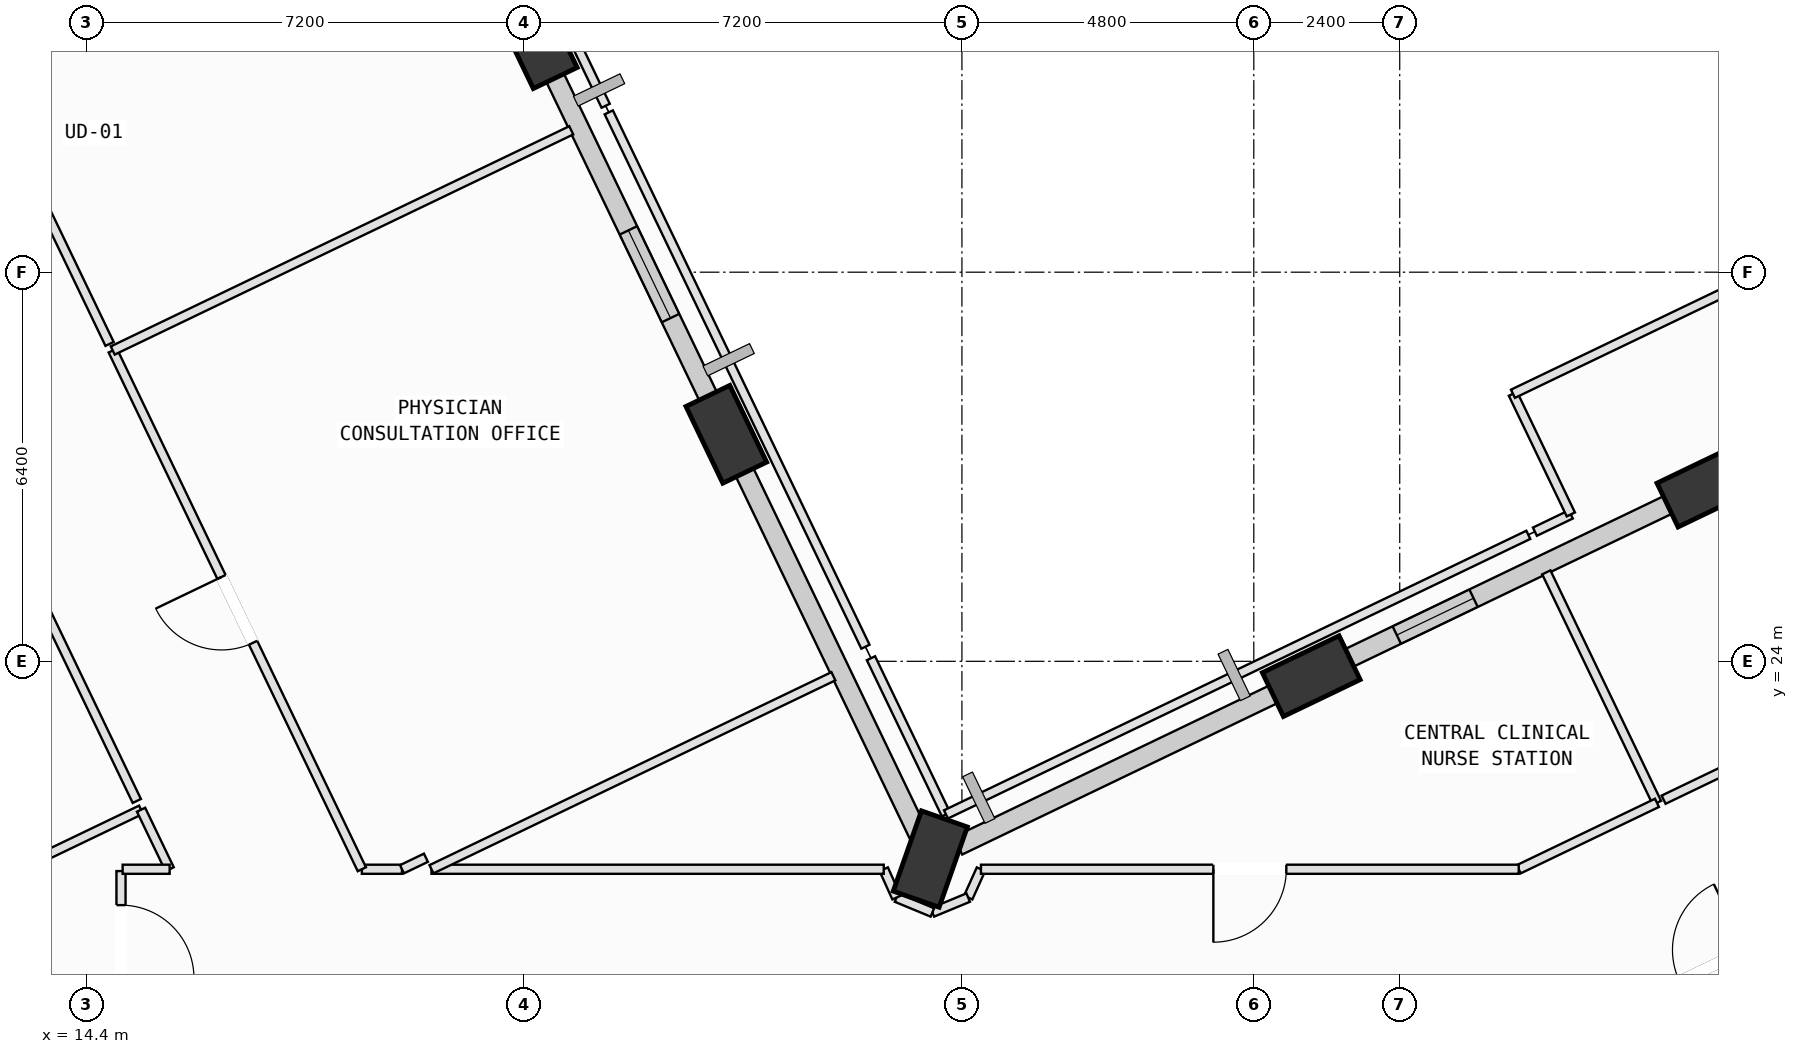
"""IFC4 building model, lengths in metres.
Left out: names, types, materials, properties, quantities, classifications, styles, units other than length and angle.
Written with IfcOpenShell. Run it as: python <this file> out.ifc"""

import sys

from ifc_helpers import new_model, si_unit, direction, frame, frame_2d, origin, origin_2d, place, context, subcontext, project, spatial, rectangle, extrude, element, fill, save


model = new_model("IFC4")
c1 = context("Model", 3, precision=1e-05, world=origin(), true_north=direction((0.0, 1.0)))
c2 = subcontext(c1, "Body", "Model", "MODEL_VIEW")
j1 = project(units=[si_unit("LENGTHUNIT", "METRE"), si_unit("PLANEANGLEUNIT", "RADIAN")], contexts=[c1])
p1 = place(None, origin())
s1 = spatial("IfcSite", under=j1, at=p1, CompositionType="ELEMENT")
p2 = place(p1, origin())
s2 = spatial("IfcBuilding", under=s1, at=p2, CompositionType="ELEMENT")
p3 = place(p2, frame((0.0, 0.0, 132.4)))
s3 = spatial("IfcBuildingStorey", under=s2, at=p3, CompositionType="ELEMENT", Elevation=132.4)
p4 = place(p3, frame((41.035, 26.873, 0.002), z_axis=(-0.00885366467, 0.030774117199, 0.99948715166), x_axis=(-0.746694417062, -0.665022783918, 0.013861616019)))
e1 = element("IfcColumn", 1, at=p4, inside=s3, PredefinedType="COLUMN", context=c2, shape_type="SweptSolid", body=[
    extrude(rectangle(XDim=1.4, YDim=0.8, at=origin_2d()), origin(), (0.0, 0.0, 1.0), 3.998),
])
p5 = place(p3, frame((34.545, 23.756, 0.002), z_axis=(0.004276303261, 0.003970853028, 0.999982972633), x_axis=(-0.930596934724, 0.366036834219, 0.002526079248)))
e2 = element("IfcColumn", 2, at=p5, inside=s3, PredefinedType="COLUMN", context=c2, shape_type="SweptSolid", body=[
    extrude(rectangle(XDim=1.4, YDim=0.8, at=origin_2d()), origin(), (0.0, 0.0, 1.0), 3.996),
])
p6 = place(p3, frame((28.28, 20.748, 0.002), z_axis=(0.01697679214, -0.021923267547, 0.999615505516), x_axis=(-0.315480626225, 0.948571315407, 0.026161690777)))
e3 = element("IfcColumn", 3, at=p6, inside=s3, PredefinedType="COLUMN", context=c2, shape_type="SweptSolid", body=[
    extrude(rectangle(XDim=1.4, YDim=0.8, at=origin_2d()), origin(), (0.0, 0.0, 1.0), 3.998),
])
p7 = place(p3, frame((24.925, 27.734, 0.002), z_axis=(-0.011843149129, -0.036017824671, 0.99928096956), x_axis=(-0.129836305253, 0.990946191791, 0.034178630945)))
e4 = element("IfcColumn", 4, at=p7, inside=s3, PredefinedType="COLUMN", context=c2, shape_type="SweptSolid", body=[
    extrude(rectangle(XDim=1.4, YDim=0.8, at=origin_2d()), origin(), (0.0, 0.0, 1.0), 3.999),
])
p8 = place(p3, frame((21.808, 34.224, 0.002), z_axis=(-0.038595202301, -0.049082366275, 0.998048762176), x_axis=(0.215850292416, 0.974802805821, 0.056286241908)))
e5 = element("IfcColumn", 5, at=p8, inside=s3, PredefinedType="COLUMN", context=c2, shape_type="SweptSolid", body=[
    extrude(rectangle(XDim=1.4, YDim=0.8, at=origin_2d()), origin(), (0.0, 0.0, 1.0), 4.004),
])
p9 = place(p3, frame((35.002, 23.976, 0.0), z_axis=(0.0, 0.0, 1.0), x_axis=(0.901466619475, 0.432848627089, 0.0)))
e6 = element("IfcWall", 6, at=p9, inside=s3, PredefinedType="SOLIDWALL", context=c2, shape_type="SweptSolid", body=[
    extrude(rectangle(XDim=6.211, YDim=0.32, at=frame_2d((3.105, 0.0))), origin(), (0.0, 0.0, 1.0), 3.165),
])
p10 = place(p9, frame((1.053, 0.0, 0.75)))
e7 = element("IfcOpeningElement", 7, at=p10, cuts=e6, PredefinedType="OPENING", context=c2, shape_type="SweptSolid", body=[
    extrude(rectangle(XDim=1.4, YDim=1.85, at=frame_2d((0.7, 0.925))), frame((0.0, 0.17, 0.0), z_axis=(0.0, -1.0, 0.0), x_axis=(1.0, 0.0, 0.0)), (0.0, 0.0, 1.0), 0.34),
])
p11 = place(p3, frame((28.735, 20.966, 0.0), z_axis=(0.0, 0.0, 1.0), x_axis=(0.901457206076, 0.432868231237, 0.0)))
e8 = element("IfcWall", 8, at=p11, inside=s3, PredefinedType="SOLIDWALL", context=c2, shape_type="SweptSolid", body=[
    extrude(rectangle(XDim=5.96, YDim=0.32, at=frame_2d((2.98, 0.0))), origin(), (0.0, 0.0, 1.0), 2.965),
])
p12 = place(p3, frame((25.162, 27.24, 0.0), z_axis=(0.0, 0.0, 1.0), x_axis=(0.432883696329, -0.901449779773, 0.0)))
e9 = element("IfcWall", 9, at=p12, inside=s3, PredefinedType="SOLIDWALL", context=c2, shape_type="SweptSolid", body=[
    extrude(rectangle(XDim=6.76, YDim=0.32, at=frame_2d((3.38, 0.0))), origin(), (0.0, 0.0, 1.0), 3.165),
])
p13 = place(p3, frame((22.042, 33.739, 0.0), z_axis=(0.0, 0.0, 1.0), x_axis=(0.432859884789, -0.901461213886, 0.0)))
e10 = element("IfcWall", 10, at=p13, inside=s3, PredefinedType="SOLIDWALL", context=c2, shape_type="SweptSolid", body=[
    extrude(rectangle(XDim=6.223, YDim=0.32, at=frame_2d((3.111, 0.0))), origin(), (0.0, 0.0, 1.0), 3.165),
])
p14 = place(p13, frame((2.941, 0.0, 0.75)))
e11 = element("IfcOpeningElement", 11, at=p14, cuts=e10, PredefinedType="OPENING", context=c2, shape_type="SweptSolid", body=[
    extrude(rectangle(XDim=1.6, YDim=1.95, at=frame_2d((0.8, 0.975))), frame((0.0, 0.17, 0.0), z_axis=(0.0, -1.0, 0.0), x_axis=(1.0, 0.0, 0.0)), (0.0, 0.0, 1.0), 0.34),
])
p15 = place(p3, frame((36.5, 16.763, 0.0), z_axis=(0.0, 0.0, 1.0), x_axis=(0.901430980475, 0.432922842363, 0.0)))
e12 = element("IfcWall", 12, at=p15, inside=s3, PredefinedType="PARTITIONING", context=c2, shape_type="SweptSolid", body=[
    extrude(rectangle(XDim=10.305, YDim=0.15, at=frame_2d((5.152, 0.0))), origin(), (0.0, 0.0, 1.0), 2.965),
])
p16 = place(p15, frame((4.552, 0.0, 0.0)))
e13 = element("IfcOpeningElement", 13, at=p16, cuts=e12, PredefinedType="OPENING", context=c2, shape_type="SweptSolid", body=[
    extrude(rectangle(XDim=1.2, YDim=2.15, at=frame_2d((0.6, 1.075))), frame((0.0, 0.085, 0.0), z_axis=(0.0, -1.0, 0.0), x_axis=(1.0, 0.0, 0.0)), (0.0, 0.0, 1.0), 0.17),
])
p17 = place(p3, frame((14.97, 20.55, 0.0), z_axis=(0.0, 0.0, 1.0), x_axis=(0.0, -1.0, 0.0)))
e14 = element("IfcWall", 14, at=p17, inside=s3, PredefinedType="PARTITIONING", context=c2, shape_type="SweptSolid", body=[
    extrude(rectangle(XDim=2.32, YDim=0.15, at=frame_2d((1.16, 0.0))), origin(), (0.0, 0.0, 1.0), 2.965),
])
p18 = place(p17, frame((0.56, 0.0, 0.0)))
e15 = element("IfcOpeningElement", 15, at=p18, cuts=e14, PredefinedType="OPENING", context=c2, shape_type="SweptSolid", body=[
    extrude(rectangle(XDim=1.2, YDim=2.15, at=frame_2d((0.6, 1.075))), frame((0.0, 0.085, 0.0), z_axis=(0.0, -1.0, 0.0), x_axis=(1.0, 0.0, 0.0)), (0.0, 0.0, 1.0), 0.17),
])
p19 = place(p3, frame((6.812, 17.483, 0.0), z_axis=(0.0, 0.0, 1.0), x_axis=(0.90144374065, 0.432896272152, 0.0)))
e16 = element("IfcWall", 16, at=p19, inside=s3, PredefinedType="PARTITIONING", context=c2, shape_type="SweptSolid", body=[
    extrude(rectangle(XDim=9.416, YDim=0.15, at=frame_2d((4.708, 0.0))), origin(), (0.0, 0.0, 1.0), 3.78),
])
p20 = place(p3, frame((15.3, 21.559, 0.0), z_axis=(0.0, 0.0, 1.0), x_axis=(0.432767610523, -0.901505515947, 0.0)))
e17 = element("IfcWall", 17, at=p20, inside=s3, PredefinedType="PARTITIONING", context=c2, shape_type="SweptSolid", body=[
    extrude(rectangle(XDim=1.086, YDim=0.15, at=frame_2d((0.543, 0.0))), origin(), (0.0, 0.0, 1.0), 3.78),
])
p21 = place(p3, frame((15.77, 20.58, 0.0), z_axis=(0.0, 0.0, 1.0), x_axis=(-1.0, 0.0, 0.0)))
e18 = element("IfcWall", 18, at=p21, inside=s3, PredefinedType="PARTITIONING", context=c2, shape_type="SweptSolid", body=[
    extrude(rectangle(XDim=0.773, YDim=0.15, at=frame_2d((0.386, 0.0))), origin(), (0.0, 0.0, 1.0), 3.78),
])
p22 = place(p3, frame((9.499, 33.638, 0.0), z_axis=(0.0, 0.0, 1.0), x_axis=(0.432861750003, -0.901460318253, 0.0)))
e19 = element("IfcWall", 19, at=p22, inside=s3, PredefinedType="PARTITIONING", context=c2, shape_type="SweptSolid", body=[
    extrude(rectangle(XDim=13.24, YDim=0.15, at=frame_2d((6.62, 0.0))), origin(), (0.0, 0.0, 1.0), 2.965),
])
p23 = place(p22, frame((6.02, 0.0, 0.0)))
e20 = element("IfcOpeningElement", 20, at=p23, cuts=e19, PredefinedType="OPENING", context=c2, shape_type="SweptSolid", body=[
    extrude(rectangle(XDim=1.2, YDim=2.15, at=frame_2d((0.6, 1.075))), frame((0.0, 0.085, 0.0), z_axis=(0.0, -1.0, 0.0), x_axis=(1.0, 0.0, 0.0)), (0.0, 0.0, 1.0), 0.17),
])
p24 = place(p3, frame((29.113, 20.58, 0.0), z_axis=(0.0, 0.0, 1.0), x_axis=(-0.410741961607, -0.911751633382, 0.0)))
e21 = element("IfcWall", 21, at=p24, inside=s3, PredefinedType="PARTITIONING", context=c2, shape_type="SweptSolid", body=[
    extrude(rectangle(XDim=0.511, YDim=0.15, at=frame_2d((0.256, 0.0))), origin(), (0.0, 0.0, 1.0), 3.78),
])
p25 = place(p3, frame((28.903, 20.114, 0.0), z_axis=(0.0, 0.0, 1.0), x_axis=(-0.923946844683, -0.382520885967, 0.0)))
e22 = element("IfcWall", 22, at=p25, inside=s3, PredefinedType="PARTITIONING", context=c2, shape_type="SweptSolid", body=[
    extrude(rectangle(XDim=0.638, YDim=0.15, at=frame_2d((0.319, 0.0))), origin(), (0.0, 0.0, 1.0), 3.78),
])
p26 = place(p3, frame((28.314, 19.87, 0.0), z_axis=(0.0, 0.0, 1.0), x_axis=(-0.924114659462, 0.382115291723, 0.0)))
e23 = element("IfcWall", 23, at=p26, inside=s3, PredefinedType="PARTITIONING", context=c2, shape_type="SweptSolid", body=[
    extrude(rectangle(XDim=0.638, YDim=0.15, at=frame_2d((0.319, 0.0))), origin(), (0.0, 0.0, 1.0), 3.78),
])
p27 = place(p3, frame((27.724, 20.114, 0.0), z_axis=(0.0, 0.0, 1.0), x_axis=(-0.411138875134, 0.911572720826, 0.0)))
e24 = element("IfcWall", 24, at=p27, inside=s3, PredefinedType="PARTITIONING", context=c2, shape_type="SweptSolid", body=[
    extrude(rectangle(XDim=0.511, YDim=0.15, at=frame_2d((0.256, 0.0))), origin(), (0.0, 0.0, 1.0), 3.78),
])
p28 = place(p3, frame((27.514, 20.58, 0.0), z_axis=(0.0, 0.0, 1.0), x_axis=(-1.0, 0.0, 0.0)))
e25 = element("IfcWall", 25, at=p28, inside=s3, PredefinedType="PARTITIONING", context=c2, shape_type="SweptSolid", body=[
    extrude(rectangle(XDim=7.438, YDim=0.15, at=frame_2d((3.719, 0.0))), origin(), (0.0, 0.0, 1.0), 3.78),
])
p29 = place(p3, frame((20.076, 20.58, 0.0), z_axis=(0.0, 0.0, 1.0), x_axis=(0.901471094666, 0.432839306765, 0.0)))
e26 = element("IfcWall", 26, at=p29, inside=s3, PredefinedType="PARTITIONING", context=c2, shape_type="SweptSolid", body=[
    extrude(rectangle(XDim=7.333, YDim=0.15, at=frame_2d((3.666, 0.0))), origin(), (0.0, 0.0, 1.0), 3.78),
])
p30 = place(p3, frame((27.304, 24.051, 0.0), z_axis=(0.0, 0.0, 1.0), x_axis=(0.433006738205, -0.901390683705, 0.0)))
e27 = element("IfcWall", 27, at=p30, inside=s3, PredefinedType="PARTITIONING", context=c2, shape_type="SweptSolid", body=[
    extrude(rectangle(XDim=2.85, YDim=0.15, at=frame_2d((1.425, 0.0))), origin(), (0.0, 0.0, 1.0), 3.78),
])
p31 = place(p3, frame((28.538, 21.482, 0.0), z_axis=(0.0, 0.0, 1.0), x_axis=(0.901477867435, 0.432825200889, 0.0)))
e28 = element("IfcWall", 28, at=p31, inside=s3, PredefinedType="PARTITIONING", context=c2, shape_type="SweptSolid", body=[
    extrude(rectangle(XDim=10.624, YDim=0.15, at=frame_2d((5.312, 0.0))), origin(), (0.0, 0.0, 1.0), 3.78),
])
p32 = place(p3, frame((38.411, 25.463, 0.0), z_axis=(0.0, 0.0, 1.0), x_axis=(0.432827326229, -0.901476846996, 0.0)))
e29 = element("IfcWall", 29, at=p32, inside=s3, PredefinedType="PARTITIONING", context=c2, shape_type="SweptSolid", body=[
    extrude(rectangle(XDim=4.205, YDim=0.15, at=frame_2d((2.103, 0.0))), origin(), (0.0, 0.0, 1.0), 3.78),
])
p33 = place(p3, frame((40.231, 21.672, 0.0), z_axis=(0.0, 0.0, 1.0), x_axis=(-0.901436954351, -0.432910403351, 0.0)))
e30 = element("IfcWall", 30, at=p33, inside=s3, PredefinedType="PARTITIONING", context=c2, shape_type="SweptSolid", body=[
    extrude(rectangle(XDim=2.522, YDim=0.15, at=frame_2d((1.261, 0.0))), origin(), (0.0, 0.0, 1.0), 2.945),
])
p34 = place(p3, frame((37.957, 20.58, 0.0), z_axis=(0.0, 0.0, 1.0), x_axis=(-1.0, 0.0, 0.0)))
e31 = element("IfcWall", 31, at=p34, inside=s3, PredefinedType="PARTITIONING", context=c2, shape_type="SweptSolid", body=[
    extrude(rectangle(XDim=8.844, YDim=0.15, at=frame_2d((4.422, 0.0))), origin(), (0.0, 0.0, 1.0), 3.365),
])
p35 = place(p34, frame((3.822, 0.0, 0.0)))
e32 = element("IfcOpeningElement", 32, at=p35, cuts=e31, PredefinedType="OPENING", context=c2, shape_type="SweptSolid", body=[
    extrude(rectangle(XDim=1.2, YDim=2.15, at=frame_2d((0.6, 1.075))), frame((0.0, 0.085, 0.0), z_axis=(0.0, -1.0, 0.0), x_axis=(1.0, 0.0, 0.0)), (0.0, 0.0, 1.0), 0.17),
])
p36 = place(p3, frame((55.61, 29.058, 0.0), z_axis=(0.0, 0.0, 1.0), x_axis=(-0.901422279178, -0.432940959718, 0.0)))
e33 = element("IfcWall", 33, at=p36, inside=s3, PredefinedType="PARTITIONING", context=c2, shape_type="SweptSolid", body=[
    extrude(rectangle(XDim=16.94, YDim=0.15, at=frame_2d((8.47, 0.0))), origin(), (0.0, 0.0, 1.0), 2.945),
])
p37 = place(p36, frame((7.87, 0.0, 0.0)))
e34 = element("IfcOpeningElement", 34, at=p37, cuts=e33, PredefinedType="OPENING", context=c2, shape_type="SweptSolid", body=[
    extrude(rectangle(XDim=1.2, YDim=2.15, at=frame_2d((0.6, 1.075))), frame((0.0, 0.085, 0.0), z_axis=(0.0, -1.0, 0.0), x_axis=(1.0, 0.0, 0.0)), (0.0, 0.0, 1.0), 0.17),
])
p38 = place(p3, frame((38.223, 26.132, 0.0), z_axis=(0.0, 0.0, 1.0), x_axis=(0.901389385584, 0.433009440493, 0.0)))
e35 = element("IfcWall", 35, at=p38, inside=s3, PredefinedType="PARTITIONING", context=c2, shape_type="SweptSolid", body=[
    extrude(rectangle(XDim=0.656, YDim=0.15, at=frame_2d((0.328, 0.0))), origin(), (0.0, 0.0, 1.0), 3.78),
])
p39 = place(p3, frame((38.814, 26.416, 0.0), z_axis=(0.0, 0.0, 1.0), x_axis=(-0.432597604334, 0.901587107674, 0.0)))
e36 = element("IfcWall", 36, at=p39, inside=s3, PredefinedType="PARTITIONING", context=c2, shape_type="SweptSolid", body=[
    extrude(rectangle(XDim=2.2, YDim=0.15, at=frame_2d((1.1, 0.0))), origin(), (0.0, 0.0, 1.0), 3.78),
])
p40 = place(p3, frame((37.862, 28.4, 0.0), z_axis=(0.0, 0.0, 1.0), x_axis=(0.901468015734, 0.432845719175, 0.0)))
e37 = element("IfcWall", 37, at=p40, inside=s3, PredefinedType="PARTITIONING", context=c2, shape_type="SweptSolid", body=[
    extrude(rectangle(XDim=7.199, YDim=0.15, at=frame_2d((3.6, 0.0))), origin(), (0.0, 0.0, 1.0), 3.78),
])
p41 = place(p3, frame((19.591, 20.58, 0.0), z_axis=(0.0, 0.0, 1.0), x_axis=(-1.0, 0.0, 0.0)))
e38 = element("IfcWall", 38, at=p41, inside=s3, PredefinedType="PARTITIONING", context=c2, shape_type="SweptSolid", body=[
    extrude(rectangle(XDim=0.66, YDim=0.15, at=frame_2d((0.33, 0.0))), origin(), (0.0, 0.0, 1.0), 3.78),
])
p42 = place(p3, frame((18.931, 20.58, 0.0), z_axis=(0.0, 0.0, 1.0), x_axis=(-0.43286607563, 0.901458241168, 0.0)))
e39 = element("IfcWall", 39, at=p42, inside=s3, PredefinedType="PARTITIONING", context=c2, shape_type="SweptSolid", body=[
    extrude(rectangle(XDim=9.465, YDim=0.15, at=frame_2d((4.732, 0.0))), origin(), (0.0, 0.0, 1.0), 3.78),
])
p43 = place(p42, frame((4.132, 0.0, 0.0)))
e40 = element("IfcOpeningElement", 40, at=p43, cuts=e39, PredefinedType="OPENING", context=c2, shape_type="SweptSolid", body=[
    extrude(rectangle(XDim=1.2, YDim=2.15, at=frame_2d((0.6, 1.075))), frame((0.0, 0.085, 0.0), z_axis=(0.0, -1.0, 0.0), x_axis=(1.0, 0.0, 0.0)), (0.0, 0.0, 1.0), 0.17),
])
p44 = place(p3, frame((14.834, 29.112, 0.0), z_axis=(0.0, 0.0, 1.0), x_axis=(0.901468854951, 0.432843971373, 0.0)))
e41 = element("IfcWall", 41, at=p44, inside=s3, PredefinedType="PARTITIONING", context=c2, shape_type="SweptSolid", body=[
    extrude(rectangle(XDim=8.365, YDim=0.15, at=frame_2d((4.183, 0.0))), origin(), (0.0, 0.0, 1.0), 3.78),
])
p45 = place(p3, frame((22.992, 33.029, 0.0), z_axis=(0.0, 0.0, 1.0), x_axis=(0.432914217611, -0.901435122563, 0.0)))
e42 = element("IfcWall", 42, at=p45, inside=s3, PredefinedType="PARTITIONING", context=c2, shape_type="SweptSolid", body=[
    extrude(rectangle(XDim=9.75, YDim=0.15, at=frame_2d((4.875, 0.0))), origin(), (0.0, 0.0, 1.0), 3.78),
])
p46 = place(p3, frame((19.985, 20.769, 0.0), z_axis=(0.0, 0.0, 1.0), x_axis=(-0.901679917464, -0.432404123988, 0.0)))
e43 = element("IfcWall", 43, at=p46, inside=s3, PredefinedType="PARTITIONING", context=c2, shape_type="SweptSolid", body=[
    extrude(rectangle(XDim=0.437, YDim=0.15, at=frame_2d((0.219, 0.0))), origin(), (0.0, 0.0, 1.0), 3.78),
])
p47 = place(p3, frame((14.782, 29.22, 0.0), z_axis=(0.0, 0.0, 1.0), x_axis=(-0.432781462807, 0.901498866029, 0.0)))
e44 = element("IfcWall", 44, at=p47, inside=s3, PredefinedType="PARTITIONING", context=c2, shape_type="SweptSolid", body=[
    extrude(rectangle(XDim=6.93, YDim=0.15, at=frame_2d((3.465, 0.0))), origin(), (0.0, 0.0, 1.0), 3.78),
])
p48 = place(p47, frame((3.005, 0.0, 0.0)))
e45 = element("IfcOpeningElement", 45, at=p48, cuts=e44, PredefinedType="OPENING", context=c2, shape_type="SweptSolid", body=[
    extrude(rectangle(XDim=0.92, YDim=2.1, at=frame_2d((0.46, 1.05))), frame((0.0, 0.085, 0.0), z_axis=(0.0, -1.0, 0.0), x_axis=(1.0, 0.0, 0.0)), (0.0, 0.0, 1.0), 0.17),
])
p49 = place(p3, frame((19.941, 39.384, 0.0), z_axis=(0.0, 0.0, 1.0), x_axis=(0.432895982314, -0.901443879838, 0.0)))
e46 = element("IfcWall", 46, at=p49, inside=s3, PredefinedType="PARTITIONING", context=c2, shape_type="SweptSolid", body=[
    extrude(rectangle(XDim=6.93, YDim=0.15, at=frame_2d((3.465, 0.0))), origin(), (0.0, 0.0, 1.0), 3.78),
])
p50 = place(p10, origin())
e47 = element("IfcWindow", 47, at=p50, inside=s3, PartitioningType="SINGLE_PANEL", PredefinedType="WINDOW", context=c2, shape_type="SweptSolid", body=[
    extrude(rectangle(XDim=1.4, YDim=1.85, at=frame_2d((0.7, 0.925))), frame((0.0, 0.03, 0.0), z_axis=(0.0, -1.0, 0.0), x_axis=(1.0, 0.0, 0.0)), (0.0, 0.0, 1.0), 0.06),
])
fill(e7, e47)
p51 = place(p14, origin())
e48 = element("IfcWindow", 48, at=p51, inside=s3, PartitioningType="SINGLE_PANEL", PredefinedType="WINDOW", context=c2, shape_type="SweptSolid", body=[
    extrude(rectangle(XDim=1.6, YDim=1.95, at=frame_2d((0.8, 0.975))), frame((0.0, 0.03, 0.0), z_axis=(0.0, -1.0, 0.0), x_axis=(1.0, 0.0, 0.0)), (0.0, 0.0, 1.0), 0.06),
])
fill(e11, e48)
p52 = place(p16, origin())
e49 = element("IfcDoor", 49, at=p52, inside=s3, OperationType="SINGLE_SWING_RIGHT", PredefinedType="DOOR", context=c2, shape_type="SweptSolid", body=[
    extrude(rectangle(XDim=1.2, YDim=2.15, at=frame_2d((0.6, 1.075))), frame((0.0, 0.025, 0.0), z_axis=(0.0, -1.0, 0.0), x_axis=(1.0, 0.0, 0.0)), (0.0, 0.0, 1.0), 0.05),
])
fill(e13, e49)
p53 = place(p18, origin())
e50 = element("IfcDoor", 50, at=p53, inside=s3, OperationType="SINGLE_SWING_RIGHT", PredefinedType="DOOR", context=c2, shape_type="SweptSolid", body=[
    extrude(rectangle(XDim=1.2, YDim=2.15, at=frame_2d((0.6, 1.075))), frame((0.0, 0.025, 0.0), z_axis=(0.0, -1.0, 0.0), x_axis=(1.0, 0.0, 0.0)), (0.0, 0.0, 1.0), 0.05),
])
fill(e15, e50)
p54 = place(p35, origin())
e51 = element("IfcDoor", 51, at=p54, inside=s3, OperationType="SINGLE_SWING_RIGHT", PredefinedType="DOOR", context=c2, shape_type="SweptSolid", body=[
    extrude(rectangle(XDim=1.2, YDim=2.15, at=frame_2d((0.6, 1.075))), frame((0.0, 0.025, 0.0), z_axis=(0.0, -1.0, 0.0), x_axis=(1.0, 0.0, 0.0)), (0.0, 0.0, 1.0), 0.05),
])
fill(e32, e51)
p55 = place(p43, origin())
e52 = element("IfcDoor", 52, at=p55, inside=s3, OperationType="SINGLE_SWING_RIGHT", PredefinedType="DOOR", context=c2, shape_type="SweptSolid", body=[
    extrude(rectangle(XDim=1.2, YDim=2.15, at=frame_2d((0.6, 1.075))), frame((0.0, 0.025, 0.0), z_axis=(0.0, -1.0, 0.0), x_axis=(1.0, 0.0, 0.0)), (0.0, 0.0, 1.0), 0.05),
])
fill(e40, e52)
save(model, sys.argv[1])
